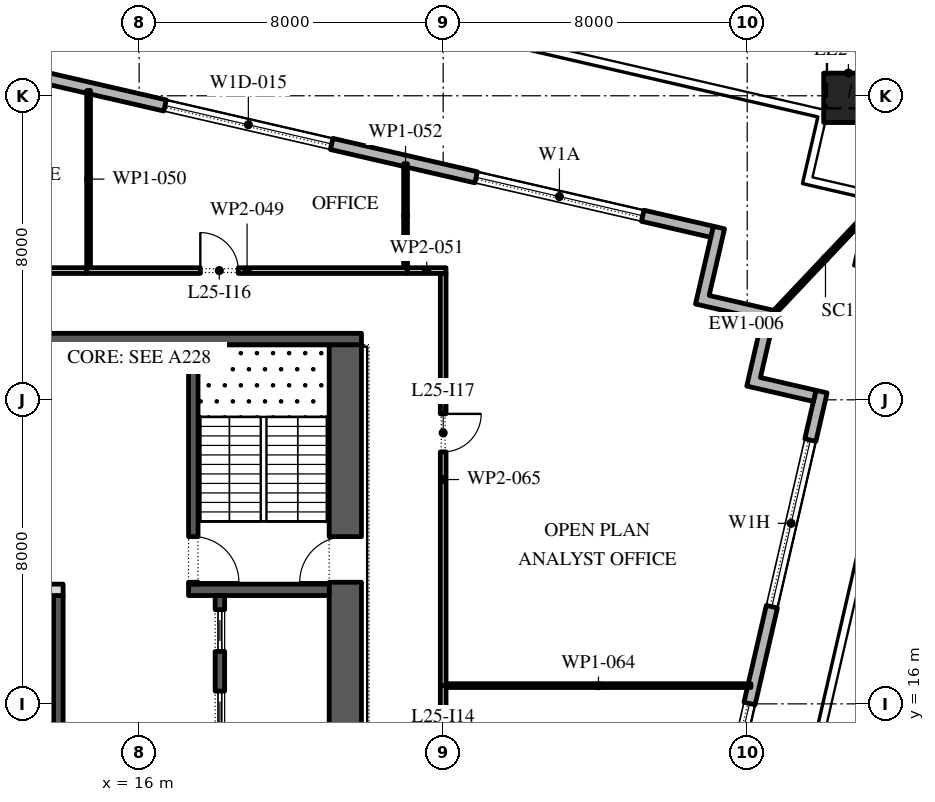
"""IFC4 building model, lengths in metres.
Left out: names, types, materials, properties, quantities, classifications, styles, units other than length and angle.
Written with IfcOpenShell. Run it as: python <this file> out.ifc"""

import sys

from ifc_helpers import new_model, si_unit, direction, frame, frame_2d, origin, origin_2d, place, context, subcontext, project, spatial, polyline, rectangle, outline, extrude, element, fill, save


model = new_model("IFC4")
c1 = context("Model", 3, precision=1e-05, world=origin(), true_north=direction((0.0, 1.0)))
c2 = subcontext(c1, "Body", "Model", "MODEL_VIEW")
j1 = project(units=[si_unit("LENGTHUNIT", "METRE"), si_unit("PLANEANGLEUNIT", "RADIAN")], contexts=[c1])
p1 = place(None, origin())
s1 = spatial("IfcSite", under=j1, at=p1, CompositionType="ELEMENT")
p2 = place(p1, origin())
s2 = spatial("IfcBuilding", under=s1, at=p2, CompositionType="ELEMENT")
p3 = place(p2, frame((0.0, 0.0, 118.2)))
s3 = spatial("IfcBuildingStorey", under=s2, at=p3, CompositionType="ELEMENT", Elevation=118.2)
p4 = place(p3, frame((35.552, 19.793, 0.0), z_axis=(0.017444089556, 0.075687644385, 0.996978978829), x_axis=(-0.974454034257, 0.224587032398, 0.0)))
e1 = element("IfcColumn", 1, at=p4, inside=s3, PredefinedType="COLUMN", context=c2, shape_type="SweptSolid", body=[
    extrude(rectangle(XDim=1.3, YDim=1.3, at=origin_2d()), origin(), (0.0, 0.0, 1.0), 4.213),
])
p5 = place(p3, frame((34.662, 31.946, 0.0), z_axis=(0.020377493232, 0.0882252832, 0.995892091129), x_axis=(-0.97434807649, 0.225046274885, 0.0)))
e2 = element("IfcColumn", 2, at=p5, inside=s3, PredefinedType="COLUMN", context=c2, shape_type="SweptSolid", body=[
    extrude(rectangle(XDim=1.3, YDim=1.3, at=origin_2d()), origin(), (0.0, 0.0, 1.0), 4.217),
])
p6 = place(p3, frame((22.82, -24.016, 0.0), z_axis=(0.0, 0.0, 1.0), x_axis=(0.224953880882, 0.974369412223, 0.0)))
e3 = element("IfcWall", 3, at=p6, inside=s3, PredefinedType="STANDARD", context=c2, shape_type="SweptSolid", body=[
    extrude(rectangle(XDim=49.5, YDim=0.3, at=frame_2d((24.75, 0.0))), origin(), (0.0, 0.0, 1.0), 4.0),
])
p7 = place(p6, frame((1.157, 0.0, 0.45)))
e4 = element("IfcOpeningElement", 4, at=p7, cuts=e3, PredefinedType="OPENING", context=c2, shape_type="SweptSolid", body=[
    extrude(rectangle(XDim=4.5, YDim=3.05, at=frame_2d((2.25, 1.525))), frame((0.0, 0.16, 0.0), z_axis=(0.0, -1.0, 0.0), x_axis=(1.0, 0.0, 0.0)), (0.0, 0.0, 1.0), 0.32),
])
p8 = place(p6, frame((8.121, 0.0, 0.45)))
e5 = element("IfcOpeningElement", 5, at=p8, cuts=e3, PredefinedType="OPENING", context=c2, shape_type="SweptSolid", body=[
    extrude(rectangle(XDim=4.5, YDim=3.05, at=frame_2d((2.25, 1.525))), frame((0.0, 0.16, 0.0), z_axis=(0.0, -1.0, 0.0), x_axis=(1.0, 0.0, 0.0)), (0.0, 0.0, 1.0), 0.32),
])
p9 = place(p6, frame((15.236, 0.0, 0.45)))
e6 = element("IfcOpeningElement", 6, at=p9, cuts=e3, PredefinedType="OPENING", context=c2, shape_type="SweptSolid", body=[
    extrude(rectangle(XDim=4.5, YDim=3.05, at=frame_2d((2.25, 1.525))), frame((0.0, 0.16, 0.0), z_axis=(0.0, -1.0, 0.0), x_axis=(1.0, 0.0, 0.0)), (0.0, 0.0, 1.0), 0.32),
])
p10 = place(p6, frame((23.4, 0.0, 0.0)))
e7 = element("IfcOpeningElement", 7, at=p10, cuts=e3, PredefinedType="OPENING", context=c2, shape_type="SweptSolid", body=[
    extrude(rectangle(XDim=2.4, YDim=3.5, at=frame_2d((1.2, 1.75))), frame((0.0, 0.16, 0.0), z_axis=(0.0, -1.0, 0.0), x_axis=(1.0, 0.0, 0.0)), (0.0, 0.0, 1.0), 0.32),
])
p11 = place(p6, frame((29.464, 0.0, 0.45)))
e8 = element("IfcOpeningElement", 8, at=p11, cuts=e3, PredefinedType="OPENING", context=c2, shape_type="SweptSolid", body=[
    extrude(rectangle(XDim=4.5, YDim=2.875, at=frame_2d((2.25, 1.438))), frame((0.0, 0.16, 0.0), z_axis=(0.0, -1.0, 0.0), x_axis=(1.0, 0.0, 0.0)), (0.0, 0.0, 1.0), 0.32),
])
p12 = place(p6, frame((36.579, 0.0, 0.45)))
e9 = element("IfcOpeningElement", 9, at=p12, cuts=e3, PredefinedType="OPENING", context=c2, shape_type="SweptSolid", body=[
    extrude(rectangle(XDim=4.5, YDim=2.825, at=frame_2d((2.25, 1.413))), frame((0.0, 0.16, 0.0), z_axis=(0.0, -1.0, 0.0), x_axis=(1.0, 0.0, 0.0)), (0.0, 0.0, 1.0), 0.32),
])
p13 = place(p6, frame((43.693, 0.0, 0.45)))
e10 = element("IfcOpeningElement", 10, at=p13, cuts=e3, PredefinedType="OPENING", context=c2, shape_type="SweptSolid", body=[
    extrude(rectangle(XDim=4.5, YDim=2.75, at=frame_2d((2.25, 1.375))), frame((0.0, 0.16, 0.0), z_axis=(0.0, -1.0, 0.0), x_axis=(1.0, 0.0, 0.0)), (0.0, 0.0, 1.0), 0.32),
])
p14 = place(p3, frame((31.078, 28.421, 0.0), z_axis=(0.0, 0.0, 1.0), x_axis=(-0.974370456532, 0.224949357493, 0.0)))
e11 = element("IfcWall", 11, at=p14, inside=s3, PredefinedType="STANDARD", context=c2, shape_type="SweptSolid", body=[
    extrude(rectangle(XDim=51.0, YDim=0.3, at=frame_2d((25.5, 0.0))), origin(), (0.0, 0.0, 1.0), 4.0),
])
p15 = place(p14, frame((1.875, 0.0, 0.45)))
e12 = element("IfcOpeningElement", 12, at=p15, cuts=e11, PredefinedType="OPENING", context=c2, shape_type="SweptSolid", body=[
    extrude(rectangle(XDim=4.5, YDim=3.0, at=frame_2d((2.25, 1.5))), frame((0.0, 0.16, 0.0), z_axis=(0.0, -1.0, 0.0), x_axis=(1.0, 0.0, 0.0)), (0.0, 0.0, 1.0), 0.32),
])
p16 = place(p14, frame((10.275, 0.0, 0.45)))
e13 = element("IfcOpeningElement", 13, at=p16, cuts=e11, PredefinedType="OPENING", context=c2, shape_type="SweptSolid", body=[
    extrude(rectangle(XDim=4.5, YDim=2.875, at=frame_2d((2.25, 1.438))), frame((0.0, 0.16, 0.0), z_axis=(0.0, -1.0, 0.0), x_axis=(1.0, 0.0, 0.0)), (0.0, 0.0, 1.0), 0.32),
])
p17 = place(p14, frame((18.825, 0.0, 0.45)))
e14 = element("IfcOpeningElement", 14, at=p17, cuts=e11, PredefinedType="OPENING", context=c2, shape_type="SweptSolid", body=[
    extrude(rectangle(XDim=4.5, YDim=2.825, at=frame_2d((2.25, 1.413))), frame((0.0, 0.16, 0.0), z_axis=(0.0, -1.0, 0.0), x_axis=(1.0, 0.0, 0.0)), (0.0, 0.0, 1.0), 0.32),
])
p18 = place(p14, frame((27.075, 0.0, 0.0)))
e15 = element("IfcOpeningElement", 15, at=p18, cuts=e11, PredefinedType="OPENING", context=c2, shape_type="SweptSolid", body=[
    extrude(rectangle(XDim=2.4, YDim=3.2, at=frame_2d((1.2, 1.6))), frame((0.0, 0.16, 0.0), z_axis=(0.0, -1.0, 0.0), x_axis=(1.0, 0.0, 0.0)), (0.0, 0.0, 1.0), 0.32),
])
p19 = place(p14, frame((35.925, 0.0, 0.45)))
e16 = element("IfcOpeningElement", 16, at=p19, cuts=e11, PredefinedType="OPENING", context=c2, shape_type="SweptSolid", body=[
    extrude(rectangle(XDim=4.5, YDim=2.575, at=frame_2d((2.25, 1.288))), frame((0.0, 0.16, 0.0), z_axis=(0.0, -1.0, 0.0), x_axis=(1.0, 0.0, 0.0)), (0.0, 0.0, 1.0), 0.32),
])
p20 = place(p14, frame((44.475, 0.0, 0.45)))
e17 = element("IfcOpeningElement", 17, at=p20, cuts=e11, PredefinedType="OPENING", context=c2, shape_type="SweptSolid", body=[
    extrude(rectangle(XDim=4.5, YDim=3.05, at=frame_2d((2.25, 1.525))), frame((0.0, 0.16, 0.0), z_axis=(0.0, -1.0, 0.0), x_axis=(1.0, 0.0, 0.0)), (0.0, 0.0, 1.0), 0.32),
])
p21 = place(p3, origin())
e18 = element("IfcWall", 18, at=p21, inside=s3, PredefinedType="STANDARD", context=c2, shape_type="SweptSolid", body=[
    extrude(outline(polyline([(32.393, 26.116), (30.639, 26.521), (31.111, 28.567), (31.404, 28.5), (30.999, 26.746), (32.753, 26.341), (32.348, 24.587), (33.809, 24.25), (33.742, 23.957), (31.988, 24.362), (32.393, 26.116)])), origin(), (0.0, 0.0, 1.0), 4.0),
])
p22 = place(p3, frame((32.753, 26.341, -0.05), z_axis=(0.0, 0.0, 1.0), x_axis=(0.687094563373, 0.726568001624, 0.0)))
e19 = element("IfcWall", 19, at=p22, inside=s3, PredefinedType="STANDARD", context=c2, shape_type="SweptSolid", body=[
    extrude(rectangle(XDim=3.804, YDim=0.1, at=frame_2d((1.902, 0.0))), origin(), (0.0, 0.0, 1.0), 4.05),
])
p23 = place(p3, frame((21.425, -2.45, 0.0), z_axis=(0.0, 0.0, 1.0), x_axis=(0.0, 1.0, 0.0)))
e20 = element("IfcWall", 20, at=p23, inside=s3, PredefinedType="SHEAR", context=c2, shape_type="SweptSolid", body=[
    extrude(rectangle(XDim=27.9, YDim=0.85, at=frame_2d((13.95, 0.0))), origin(), (0.0, 0.0, 1.0), 4.0),
])
p24 = place(p23, frame((5.05, 0.0, 0.0)))
e21 = element("IfcOpeningElement", 21, at=p24, cuts=e20, PredefinedType="OPENING", context=c2, shape_type="SweptSolid", body=[
    extrude(rectangle(XDim=1.2, YDim=2.1, at=frame_2d((0.6, 1.05))), frame((0.0, 0.435, 0.0), z_axis=(0.0, -1.0, 0.0), x_axis=(1.0, 0.0, 0.0)), (0.0, 0.0, 1.0), 0.87),
])
p25 = place(p23, frame((21.65, 0.0, 0.0)))
e22 = element("IfcOpeningElement", 22, at=p25, cuts=e20, PredefinedType="OPENING", context=c2, shape_type="SweptSolid", body=[
    extrude(rectangle(XDim=1.2, YDim=2.1, at=frame_2d((0.6, 1.05))), frame((0.0, 0.435, 0.0), z_axis=(0.0, -1.0, 0.0), x_axis=(1.0, 0.0, 0.0)), (0.0, 0.0, 1.0), 0.87),
])
p26 = place(p3, frame((10.15, 25.6, 0.0), z_axis=(0.0, 0.0, 1.0), x_axis=(1.0, 0.0, 0.0)))
e23 = element("IfcWall", 23, at=p26, inside=s3, PredefinedType="SHEAR", context=c2, shape_type="SweptSolid", body=[
    extrude(rectangle(XDim=11.7, YDim=0.3, at=frame_2d((5.85, 0.0))), origin(), (0.0, 0.0, 1.0), 4.0),
])
p27 = place(p3, frame((17.3, 19.0, 0.0), z_axis=(0.0, 0.0, 1.0), x_axis=(1.0, 0.0, 0.0)))
e24 = element("IfcWall", 24, at=p27, inside=s3, PredefinedType="SHEAR", context=c2, shape_type="SweptSolid", body=[
    extrude(rectangle(XDim=3.7, YDim=0.3, at=frame_2d((1.85, 0.0))), origin(), (0.0, 0.0, 1.0), 4.0),
])
p28 = place(p3, frame((17.425, 19.15, 0.0), z_axis=(0.0, 0.0, 1.0), x_axis=(0.0, 1.0, 0.0)))
e25 = element("IfcWall", 25, at=p28, inside=s3, PredefinedType="SHEAR", context=c2, shape_type="SweptSolid", body=[
    extrude(rectangle(XDim=6.3, YDim=0.25, at=frame_2d((3.15, 0.0))), origin(), (0.0, 0.0, 1.0), 4.0),
])
p29 = place(p28, frame((0.05, 0.0, 0.0)))
e26 = element("IfcOpeningElement", 26, at=p29, cuts=e25, PredefinedType="OPENING", context=c2, shape_type="SweptSolid", body=[
    extrude(rectangle(XDim=1.2, YDim=2.1, at=frame_2d((0.6, 1.05))), frame((0.0, 0.135, 0.0), z_axis=(0.0, -1.0, 0.0), x_axis=(1.0, 0.0, 0.0)), (0.0, 0.0, 1.0), 0.27),
])
p30 = place(p3, frame((18.125, 4.15, 0.0), z_axis=(0.0, 0.0, 1.0), x_axis=(0.0, 1.0, 0.0)))
e27 = element("IfcWall", 27, at=p30, inside=s3, PredefinedType="SHEAR", context=c2, shape_type="SweptSolid", body=[
    extrude(rectangle(XDim=14.7, YDim=0.25, at=frame_2d((7.35, 0.0))), origin(), (0.0, 0.0, 1.0), 4.0),
])
p31 = place(p30, frame((0.371, 0.0, 0.0)))
e28 = element("IfcOpeningElement", 28, at=p31, cuts=e27, PredefinedType="OPENING", context=c2, shape_type="SweptSolid", body=[
    extrude(rectangle(XDim=1.1, YDim=2.1, at=frame_2d((0.55, 1.05))), frame((0.0, 0.135, 0.0), z_axis=(0.0, -1.0, 0.0), x_axis=(1.0, 0.0, 0.0)), (0.0, 0.0, 1.0), 0.27),
])
p32 = place(p30, frame((2.514, 0.0, 0.0)))
e29 = element("IfcOpeningElement", 29, at=p32, cuts=e27, PredefinedType="OPENING", context=c2, shape_type="SweptSolid", body=[
    extrude(rectangle(XDim=1.1, YDim=2.1, at=frame_2d((0.55, 1.05))), frame((0.0, 0.135, 0.0), z_axis=(0.0, -1.0, 0.0), x_axis=(1.0, 0.0, 0.0)), (0.0, 0.0, 1.0), 0.27),
])
p33 = place(p30, frame((4.657, 0.0, 0.0)))
e30 = element("IfcOpeningElement", 30, at=p33, cuts=e27, PredefinedType="OPENING", context=c2, shape_type="SweptSolid", body=[
    extrude(rectangle(XDim=1.1, YDim=2.1, at=frame_2d((0.55, 1.05))), frame((0.0, 0.135, 0.0), z_axis=(0.0, -1.0, 0.0), x_axis=(1.0, 0.0, 0.0)), (0.0, 0.0, 1.0), 0.27),
])
p34 = place(p30, frame((6.8, 0.0, 0.0)))
e31 = element("IfcOpeningElement", 31, at=p34, cuts=e27, PredefinedType="OPENING", context=c2, shape_type="SweptSolid", body=[
    extrude(rectangle(XDim=1.1, YDim=2.1, at=frame_2d((0.55, 1.05))), frame((0.0, 0.135, 0.0), z_axis=(0.0, -1.0, 0.0), x_axis=(1.0, 0.0, 0.0)), (0.0, 0.0, 1.0), 0.27),
])
p35 = place(p30, frame((8.943, 0.0, 0.0)))
e32 = element("IfcOpeningElement", 32, at=p35, cuts=e27, PredefinedType="OPENING", context=c2, shape_type="SweptSolid", body=[
    extrude(rectangle(XDim=1.1, YDim=2.1, at=frame_2d((0.55, 1.05))), frame((0.0, 0.135, 0.0), z_axis=(0.0, -1.0, 0.0), x_axis=(1.0, 0.0, 0.0)), (0.0, 0.0, 1.0), 0.27),
])
p36 = place(p30, frame((11.086, 0.0, 0.0)))
e33 = element("IfcOpeningElement", 33, at=p36, cuts=e27, PredefinedType="OPENING", context=c2, shape_type="SweptSolid", body=[
    extrude(rectangle(XDim=1.1, YDim=2.1, at=frame_2d((0.55, 1.05))), frame((0.0, 0.135, 0.0), z_axis=(0.0, -1.0, 0.0), x_axis=(1.0, 0.0, 0.0)), (0.0, 0.0, 1.0), 0.27),
])
p37 = place(p30, frame((13.229, 0.0, 0.0)))
e34 = element("IfcOpeningElement", 34, at=p37, cuts=e27, PredefinedType="OPENING", context=c2, shape_type="SweptSolid", body=[
    extrude(rectangle(XDim=1.1, YDim=2.1, at=frame_2d((0.55, 1.05))), frame((0.0, 0.135, 0.0), z_axis=(0.0, -1.0, 0.0), x_axis=(1.0, 0.0, 0.0)), (0.0, 0.0, 1.0), 0.27),
])
p38 = place(p3, frame((13.875, -2.45, 0.0), z_axis=(0.0, 0.0, 1.0), x_axis=(0.0, 1.0, 0.0)))
e35 = element("IfcWall", 35, at=p38, inside=s3, PredefinedType="SHEAR", context=c2, shape_type="SweptSolid", body=[
    extrude(rectangle(XDim=21.3, YDim=0.25, at=frame_2d((10.65, 0.0))), origin(), (0.0, 0.0, 1.0), 4.0),
])
p39 = place(p38, frame((10.196, 0.0, 0.0)))
e36 = element("IfcOpeningElement", 36, at=p39, cuts=e35, PredefinedType="OPENING", context=c2, shape_type="SweptSolid", body=[
    extrude(rectangle(XDim=0.9, YDim=2.1, at=frame_2d((0.45, 1.05))), frame((0.0, 0.135, 0.0), z_axis=(0.0, -1.0, 0.0), x_axis=(1.0, 0.0, 0.0)), (0.0, 0.0, 1.0), 0.27),
])
p40 = place(p38, frame((16.475, 0.0, 0.0)))
e37 = element("IfcOpeningElement", 37, at=p40, cuts=e35, PredefinedType="OPENING", context=c2, shape_type="SweptSolid", body=[
    extrude(rectangle(XDim=0.9, YDim=2.1, at=frame_2d((0.45, 1.05))), frame((0.0, 0.135, 0.0), z_axis=(0.0, -1.0, 0.0), x_axis=(1.0, 0.0, 0.0)), (0.0, 0.0, 1.0), 0.27),
])
p41 = place(p38, frame((6.971, 0.0, 0.0)))
e38 = element("IfcOpeningElement", 38, at=p41, cuts=e35, PredefinedType="OPENING", context=c2, shape_type="SweptSolid", body=[
    extrude(rectangle(XDim=1.1, YDim=2.1, at=frame_2d((0.55, 1.05))), frame((0.0, 0.135, 0.0), z_axis=(0.0, -1.0, 0.0), x_axis=(1.0, 0.0, 0.0)), (0.0, 0.0, 1.0), 0.27),
])
p42 = place(p3, frame((11.0, 19.0, 0.0), z_axis=(0.0, 0.0, 1.0), x_axis=(1.0, 0.0, 0.0)))
e39 = element("IfcWall", 39, at=p42, inside=s3, PredefinedType="PARTITIONING", context=c2, shape_type="SweptSolid", body=[
    extrude(rectangle(XDim=3.0, YDim=0.3, at=frame_2d((1.5, 0.0))), origin(), (0.0, 0.0, 1.0), 4.0),
])
p43 = place(p3, frame((8.0, 27.4, 0.0), z_axis=(0.0, 0.0, 1.0), x_axis=(1.0, 0.0, 0.0)))
e40 = element("IfcWall", 40, at=p43, inside=s3, PredefinedType="PARTITIONING", context=c2, shape_type="SweptSolid", body=[
    extrude(rectangle(XDim=6.62, YDim=0.15, at=frame_2d((3.31, 0.0))), origin(), (0.0, 0.0, 1.0), 4.0),
])
p44 = place(p43, frame((1.52, 0.0, 0.0)))
e41 = element("IfcOpeningElement", 41, at=p44, cuts=e40, PredefinedType="OPENING", context=c2, shape_type="SweptSolid", body=[
    extrude(rectangle(XDim=1.0, YDim=2.1, at=frame_2d((0.5, 1.05))), frame((0.0, 0.085, 0.0), z_axis=(0.0, -1.0, 0.0), x_axis=(1.0, 0.0, 0.0)), (0.0, 0.0, 1.0), 0.17),
])
p45 = place(p3, frame((14.62, 27.4, 0.0), z_axis=(0.0, 0.0, 1.0), x_axis=(1.0, 0.0, 0.0)))
e42 = element("IfcWall", 42, at=p45, inside=s3, PredefinedType="PARTITIONING", context=c2, shape_type="SweptSolid", body=[
    extrude(rectangle(XDim=8.44, YDim=0.15, at=frame_2d((4.22, 0.0))), origin(), (0.0, 0.0, 1.0), 4.0),
])
p46 = place(p45, frame((2.99, 0.0, 0.0)))
e43 = element("IfcOpeningElement", 43, at=p46, cuts=e42, PredefinedType="OPENING", context=c2, shape_type="SweptSolid", body=[
    extrude(rectangle(XDim=1.0, YDim=2.1, at=frame_2d((0.5, 1.05))), frame((0.0, 0.085, 0.0), z_axis=(0.0, -1.0, 0.0), x_axis=(1.0, 0.0, 0.0)), (0.0, 0.0, 1.0), 0.17),
])
p47 = place(p3, frame((14.67, 32.138, 0.0), z_axis=(0.0, 0.0, 1.0), x_axis=(0.0, -1.0, 0.0)))
e44 = element("IfcWall", 44, at=p47, inside=s3, PredefinedType="PARTITIONING", context=c2, shape_type="SweptSolid", body=[
    extrude(rectangle(XDim=4.663, YDim=0.1, at=frame_2d((2.332, 0.0))), origin(), (0.0, 0.0, 1.0), 4.0),
])
p48 = place(p3, frame((23.06, 27.4, 0.0), z_axis=(0.0, 0.0, 1.0), x_axis=(1.0, 0.0, 0.0)))
e45 = element("IfcWall", 45, at=p48, inside=s3, PredefinedType="PARTITIONING", context=c2, shape_type="SweptSolid", body=[
    extrude(rectangle(XDim=1.015, YDim=0.15, at=frame_2d((0.507, 0.0))), origin(), (0.0, 0.0, 1.0), 4.0),
])
p49 = place(p3, frame((23.01, 30.212, 0.0), z_axis=(0.0, 0.0, 1.0), x_axis=(0.0, -1.0, 0.0)))
e46 = element("IfcWall", 46, at=p49, inside=s3, PredefinedType="PARTITIONING", context=c2, shape_type="SweptSolid", body=[
    extrude(rectangle(XDim=2.737, YDim=0.1, at=frame_2d((1.368, 0.0))), origin(), (0.0, 0.0, 1.0), 4.0),
])
p50 = place(p3, frame((24.0, 16.48, 0.0), z_axis=(0.0, 0.0, 1.0), x_axis=(0.0, -1.0, 0.0)))
e47 = element("IfcWall", 47, at=p50, inside=s3, PredefinedType="PARTITIONING", context=c2, shape_type="SweptSolid", body=[
    extrude(rectangle(XDim=6.09, YDim=0.15, at=frame_2d((3.045, 0.0))), origin(), (0.0, 0.0, 1.0), 4.0),
])
p51 = place(p50, frame((1.44, 0.0, 0.0)))
e48 = element("IfcOpeningElement", 48, at=p51, cuts=e47, PredefinedType="OPENING", context=c2, shape_type="SweptSolid", body=[
    extrude(rectangle(XDim=1.0, YDim=2.1, at=frame_2d((0.5, 1.05))), frame((0.0, 0.085, 0.0), z_axis=(0.0, -1.0, 0.0), x_axis=(1.0, 0.0, 0.0)), (0.0, 0.0, 1.0), 0.17),
])
p52 = place(p3, frame((24.075, 16.48, 0.0), z_axis=(0.0, 0.0, 1.0), x_axis=(1.0, 0.0, 0.0)))
e49 = element("IfcWall", 49, at=p52, inside=s3, PredefinedType="PARTITIONING", context=c2, shape_type="SweptSolid", body=[
    extrude(rectangle(XDim=8.023, YDim=0.1, at=frame_2d((4.011, 0.0))), origin(), (0.0, 0.0, 1.0), 4.0),
])
p53 = place(p3, frame((24.0, 27.325, 0.0), z_axis=(0.0, 0.0, 1.0), x_axis=(0.0, -1.0, 0.0)))
e50 = element("IfcWall", 50, at=p53, inside=s3, PredefinedType="PARTITIONING", context=c2, shape_type="SweptSolid", body=[
    extrude(rectangle(XDim=10.845, YDim=0.15, at=frame_2d((5.422, 0.0))), origin(), (0.0, 0.0, 1.0), 4.0),
])
p54 = place(p53, frame((3.695, 0.0, 0.0)))
e51 = element("IfcOpeningElement", 51, at=p54, cuts=e50, PredefinedType="OPENING", context=c2, shape_type="SweptSolid", body=[
    extrude(rectangle(XDim=1.0, YDim=2.1, at=frame_2d((0.5, 1.05))), frame((0.0, 0.085, 0.0), z_axis=(0.0, -1.0, 0.0), x_axis=(1.0, 0.0, 0.0)), (0.0, 0.0, 1.0), 0.17),
])
p55 = place(p12, origin())
e52 = element("IfcWindow", 52, at=p55, inside=s3, PartitioningType="DOUBLE_PANEL_VERTICAL", PredefinedType="WINDOW", context=c2, shape_type="SweptSolid", body=[
    extrude(rectangle(XDim=4.5, YDim=2.825, at=frame_2d((2.25, 1.413))), frame((0.0, 0.03, 0.0), z_axis=(0.0, -1.0, 0.0), x_axis=(1.0, 0.0, 0.0)), (0.0, 0.0, 1.0), 0.06),
])
fill(e9, e52)
p56 = place(p13, origin())
e53 = element("IfcWindow", 53, at=p56, inside=s3, PartitioningType="DOUBLE_PANEL_VERTICAL", PredefinedType="WINDOW", context=c2, shape_type="SweptSolid", body=[
    extrude(rectangle(XDim=4.5, YDim=2.75, at=frame_2d((2.25, 1.375))), frame((0.0, 0.03, 0.0), z_axis=(0.0, -1.0, 0.0), x_axis=(1.0, 0.0, 0.0)), (0.0, 0.0, 1.0), 0.06),
])
fill(e10, e53)
p57 = place(p15, origin())
e54 = element("IfcWindow", 54, at=p57, inside=s3, PartitioningType="DOUBLE_PANEL_VERTICAL", PredefinedType="WINDOW", context=c2, shape_type="SweptSolid", body=[
    extrude(rectangle(XDim=4.5, YDim=3.0, at=frame_2d((2.25, 1.5))), frame((0.0, 0.03, 0.0), z_axis=(0.0, -1.0, 0.0), x_axis=(1.0, 0.0, 0.0)), (0.0, 0.0, 1.0), 0.06),
])
fill(e12, e54)
p58 = place(p16, origin())
e55 = element("IfcWindow", 55, at=p58, inside=s3, PartitioningType="DOUBLE_PANEL_VERTICAL", PredefinedType="WINDOW", context=c2, shape_type="SweptSolid", body=[
    extrude(rectangle(XDim=4.5, YDim=2.875, at=frame_2d((2.25, 1.438))), frame((0.0, 0.03, 0.0), z_axis=(0.0, -1.0, 0.0), x_axis=(1.0, 0.0, 0.0)), (0.0, 0.0, 1.0), 0.06),
])
fill(e13, e55)
p59 = place(p36, origin())
e56 = element("IfcDoor", 56, at=p59, inside=s3, OperationType="SLIDING_TO_LEFT", PredefinedType="DOOR", context=c2, shape_type="SweptSolid", body=[
    extrude(rectangle(XDim=1.1, YDim=2.1, at=frame_2d((0.55, 1.05))), frame((0.0, 0.025, 0.0), z_axis=(0.0, -1.0, 0.0), x_axis=(1.0, 0.0, 0.0)), (0.0, 0.0, 1.0), 0.05),
])
fill(e33, e56)
p60 = place(p37, origin())
e57 = element("IfcDoor", 57, at=p60, inside=s3, OperationType="SLIDING_TO_LEFT", PredefinedType="DOOR", context=c2, shape_type="SweptSolid", body=[
    extrude(rectangle(XDim=1.1, YDim=2.1, at=frame_2d((0.55, 1.05))), frame((0.0, 0.025, 0.0), z_axis=(0.0, -1.0, 0.0), x_axis=(1.0, 0.0, 0.0)), (0.0, 0.0, 1.0), 0.05),
])
fill(e34, e57)
p61 = place(p29, frame((1.2, 0.0, 0.0), z_axis=(0.0, 0.0, 1.0), x_axis=(-1.0, 0.0, 0.0)))
e58 = element("IfcDoor", 58, at=p61, inside=s3, OperationType="SINGLE_SWING_LEFT", PredefinedType="DOOR", context=c2, shape_type="SweptSolid", body=[
    extrude(rectangle(XDim=1.2, YDim=2.1, at=frame_2d((0.6, 1.05))), frame((0.0, 0.025, 0.0), z_axis=(0.0, -1.0, 0.0), x_axis=(1.0, 0.0, 0.0)), (0.0, 0.0, 1.0), 0.05),
])
fill(e26, e58)
p62 = place(p25, origin())
e59 = element("IfcDoor", 59, at=p62, inside=s3, OperationType="SINGLE_SWING_RIGHT", PredefinedType="DOOR", context=c2, shape_type="SweptSolid", body=[
    extrude(rectangle(XDim=1.2, YDim=2.1, at=frame_2d((0.6, 1.05))), frame((0.0, 0.025, 0.0), z_axis=(0.0, -1.0, 0.0), x_axis=(1.0, 0.0, 0.0)), (0.0, 0.0, 1.0), 0.05),
])
fill(e22, e59)
p63 = place(p46, origin())
e60 = element("IfcDoor", 60, at=p63, inside=s3, OperationType="SINGLE_SWING_RIGHT", PredefinedType="DOOR", context=c2, shape_type="SweptSolid", body=[
    extrude(rectangle(XDim=1.0, YDim=2.1, at=frame_2d((0.5, 1.05))), frame((0.0, 0.025, 0.0), z_axis=(0.0, -1.0, 0.0), x_axis=(1.0, 0.0, 0.0)), (0.0, 0.0, 1.0), 0.05),
])
fill(e43, e60)
p64 = place(p54, origin())
e61 = element("IfcDoor", 61, at=p64, inside=s3, OperationType="SINGLE_SWING_RIGHT", PredefinedType="DOOR", context=c2, shape_type="SweptSolid", body=[
    extrude(rectangle(XDim=1.0, YDim=2.1, at=frame_2d((0.5, 1.05))), frame((0.0, 0.025, 0.0), z_axis=(0.0, -1.0, 0.0), x_axis=(1.0, 0.0, 0.0)), (0.0, 0.0, 1.0), 0.05),
])
fill(e51, e61)
save(model, sys.argv[1])
